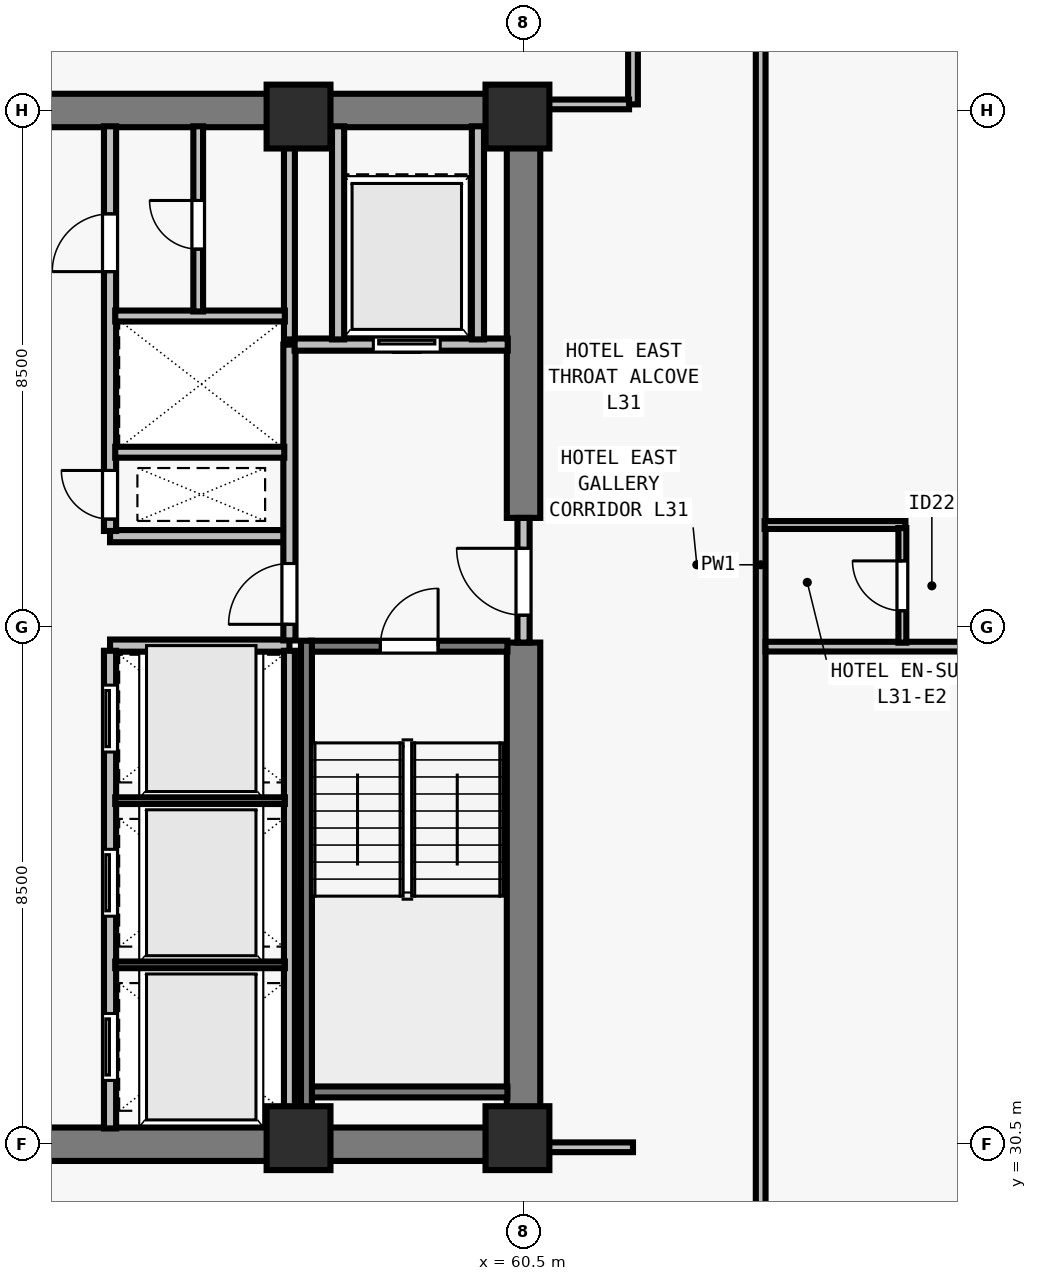
"""IFC4 building model, lengths in metres.
Left out: names, types, materials, properties, quantities, classifications, styles, units other than length and angle.
Written with IfcOpenShell. Run it as: python <this file> out.ifc"""

import sys

from ifc_helpers import new_model, si_unit, direction, frame, frame_2d, origin, origin_2d, place, context, subcontext, project, spatial, rectangle, extrude, element, fill, save


model = new_model("IFC4")
c1 = context("Model", 3, precision=1e-05, world=origin(), true_north=direction((0.0, 1.0)))
c2 = subcontext(c1, "Body", "Model", "MODEL_VIEW")
j1 = project(units=[si_unit("LENGTHUNIT", "METRE"), si_unit("PLANEANGLEUNIT", "RADIAN")], contexts=[c1])
p1 = place(None, origin())
s1 = spatial("IfcSite", under=j1, at=p1, CompositionType="ELEMENT")
p2 = place(p1, origin())
s2 = spatial("IfcBuilding", under=s1, at=p2, CompositionType="ELEMENT")
p3 = place(p2, frame((0.0, 0.0, 116.5)))
s3 = spatial("IfcBuildingStorey", under=s2, at=p3, CompositionType="ELEMENT", Elevation=116.5)
for number, where, z_axis, x_axis in (
    (1, (56.8, 30.6, 0.0), (0.0, 0.0, 1.0), (1.0, 0.0, 0.0)),
    (2, (60.4, 30.6, 0.0), (0.0, 0.0, 1.0), (1.0, 0.0, 0.0)),
    (3, (56.8, 47.4, 0.0), (0.0, 0.0, 1.0), (1.0, 0.0, 0.0)),
    (4, (60.4, 47.4, 0.0), (0.0, 0.0, 1.0), (1.0, 0.0, 0.0)),
):
    element("IfcColumn", number, at=place(p3, frame(where, z_axis=z_axis, x_axis=x_axis)), inside=s3, PredefinedType="COLUMN", context=c2, shape_type="SweptSolid", body=[
        extrude(rectangle(XDim=1.05, YDim=1.05, at=origin_2d()), origin(), (0.0, 0.0, 1.0), 3.5),
    ])
for number, where, z_axis, x_axis in (
    (5, (43.225, 30.5, 0.0), (0.0, 0.0, 1.0), (1.0, 0.0, 0.0)),
    (6, (43.225, 47.5, 0.0), (0.0, 0.0, 1.0), (1.0, 0.0, 0.0)),
):
    element("IfcWall", number, at=place(p3, frame(where, z_axis=z_axis, x_axis=x_axis)), inside=s3, PredefinedType="SHEAR", context=c2, shape_type="SweptSolid", body=[
        extrude(rectangle(XDim=17.55, YDim=0.55, at=frame_2d((8.775, 0.0))), origin(), (0.0, 0.0, 1.0), 3.28),
    ])
p4 = place(p3, frame((60.5, 30.765, 0.0), z_axis=(0.0, 0.0, 1.0), x_axis=(0.0, 1.0, 0.0)))
e7 = element("IfcWall", 7, at=p4, inside=s3, PredefinedType="SHEAR", context=c2, shape_type="SweptSolid", body=[
    extrude(rectangle(XDim=7.985, YDim=0.55, at=frame_2d((3.993, 0.0))), origin(), (0.0, 0.0, 1.0), 3.28),
])
p5 = place(p3, frame((60.5, 40.8, 0.0), z_axis=(0.0, 0.0, 1.0), x_axis=(0.0, 1.0, 0.0)))
e8 = element("IfcWall", 8, at=p5, inside=s3, PredefinedType="SHEAR", context=c2, shape_type="SweptSolid", body=[
    extrude(rectangle(XDim=6.435, YDim=0.55, at=frame_2d((3.218, 0.0))), origin(), (0.0, 0.0, 1.0), 3.28),
])
for number, where, z_axis, x_axis in (
    (9, (53.7, 38.7, 0.0), (0.0, 0.0, 1.0), (1.0, 0.0, 0.0)),
    (10, (53.7, 40.5, 0.0), (0.0, 0.0, 1.0), (1.0, 0.0, 0.0)),
):
    element("IfcWall", number, at=place(p3, frame(where, z_axis=z_axis, x_axis=x_axis)), inside=s3, PredefinedType="SOLIDWALL", context=c2, shape_type="SweptSolid", body=[
        extrude(rectangle(XDim=2.95, YDim=0.2, at=frame_2d((1.475, 0.0))), origin(), (0.0, 0.0, 1.0), 3.28),
    ])
p6 = place(p3, frame((53.7, 30.76, 0.0), z_axis=(0.0, 0.0, 1.0), x_axis=(0.0, 1.0, 0.0)))
e11 = element("IfcWall", 11, at=p6, inside=s3, PredefinedType="SOLIDWALL", context=c2, shape_type="SweptSolid", body=[
    extrude(rectangle(XDim=7.855, YDim=0.2, at=frame_2d((3.927, 0.0))), origin(), (0.0, 0.0, 1.0), 3.28),
])
p7 = place(p6, frame((0.79, 0.0, 0.0)))
e12 = element("IfcOpeningElement", 12, at=p7, cuts=e11, PredefinedType="OPENING", context=c2, shape_type="SweptSolid", body=[
    extrude(rectangle(XDim=1.1, YDim=2.2, at=frame_2d((0.55, 1.1))), frame((0.0, 0.11, 0.0), z_axis=(0.0, -1.0, 0.0), x_axis=(1.0, 0.0, 0.0)), (0.0, 0.0, 1.0), 0.22),
])
p8 = place(p6, frame((3.49, 0.0, 0.0)))
e13 = element("IfcOpeningElement", 13, at=p8, cuts=e11, PredefinedType="OPENING", context=c2, shape_type="SweptSolid", body=[
    extrude(rectangle(XDim=1.1, YDim=2.2, at=frame_2d((0.55, 1.1))), frame((0.0, 0.11, 0.0), z_axis=(0.0, -1.0, 0.0), x_axis=(1.0, 0.0, 0.0)), (0.0, 0.0, 1.0), 0.22),
])
p9 = place(p6, frame((6.19, 0.0, 0.0)))
e14 = element("IfcOpeningElement", 14, at=p9, cuts=e11, PredefinedType="OPENING", context=c2, shape_type="SweptSolid", body=[
    extrude(rectangle(XDim=1.1, YDim=2.2, at=frame_2d((0.55, 1.1))), frame((0.0, 0.11, 0.0), z_axis=(0.0, -1.0, 0.0), x_axis=(1.0, 0.0, 0.0)), (0.0, 0.0, 1.0), 0.22),
])
p10 = place(p3, frame((53.7, 40.585, 0.0), z_axis=(0.0, 0.0, 1.0), x_axis=(0.0, 1.0, 0.0)))
e15 = element("IfcWall", 15, at=p10, inside=s3, PredefinedType="SOLIDWALL", context=c2, shape_type="SweptSolid", body=[
    extrude(rectangle(XDim=6.655, YDim=0.2, at=frame_2d((3.328, 0.0))), origin(), (0.0, 0.0, 1.0), 3.28),
])
p11 = place(p10, frame((0.195, 0.0, 0.0)))
e16 = element("IfcOpeningElement", 16, at=p11, cuts=e15, PredefinedType="OPENING", context=c2, shape_type="SweptSolid", body=[
    extrude(rectangle(XDim=0.8, YDim=2.08, at=frame_2d((0.4, 1.04))), frame((0.0, 0.11, 0.0), z_axis=(0.0, -1.0, 0.0), x_axis=(1.0, 0.0, 0.0)), (0.0, 0.0, 1.0), 0.22),
])
p12 = place(p10, frame((4.265, 0.0, 0.0)))
e17 = element("IfcOpeningElement", 17, at=p12, cuts=e15, PredefinedType="OPENING", context=c2, shape_type="SweptSolid", body=[
    extrude(rectangle(XDim=0.95, YDim=2.12, at=frame_2d((0.475, 1.06))), frame((0.0, 0.11, 0.0), z_axis=(0.0, -1.0, 0.0), x_axis=(1.0, 0.0, 0.0)), (0.0, 0.0, 1.0), 0.22),
])
p13 = place(p3, frame((60.5, 38.75, 0.0), z_axis=(0.0, 0.0, 1.0), x_axis=(0.0, 1.0, 0.0)))
e18 = element("IfcWall", 18, at=p13, inside=s3, PredefinedType="SOLIDWALL", context=c2, shape_type="SweptSolid", body=[
    extrude(rectangle(XDim=2.05, YDim=0.2, at=frame_2d((1.025, 0.0))), origin(), (0.0, 0.0, 1.0), 3.28),
])
p14 = place(p13, frame((0.45, 0.0, 0.0)))
e19 = element("IfcOpeningElement", 19, at=p14, cuts=e18, PredefinedType="OPENING", context=c2, shape_type="SweptSolid", body=[
    extrude(rectangle(XDim=1.1, YDim=2.15, at=frame_2d((0.55, 1.075))), frame((0.0, 0.11, 0.0), z_axis=(0.0, -1.0, 0.0), x_axis=(1.0, 0.0, 0.0)), (0.0, 0.0, 1.0), 0.22),
])
p15 = place(p3, frame((56.65, 38.785, 0.0), z_axis=(0.0, 0.0, 1.0), x_axis=(0.0, 1.0, 0.0)))
e20 = element("IfcWall", 20, at=p15, inside=s3, PredefinedType="SOLIDWALL", context=c2, shape_type="SweptSolid", body=[
    extrude(rectangle(XDim=4.865, YDim=0.2, at=frame_2d((2.433, 0.0))), origin(), (0.0, 0.0, 1.0), 3.28),
])
p16 = place(p15, frame((0.265, 0.0, 0.0)))
e21 = element("IfcOpeningElement", 21, at=p16, cuts=e20, PredefinedType="OPENING", context=c2, shape_type="SweptSolid", body=[
    extrude(rectangle(XDim=1.0, YDim=2.15, at=frame_2d((0.5, 1.075))), frame((0.0, 0.11, 0.0), z_axis=(0.0, -1.0, 0.0), x_axis=(1.0, 0.0, 0.0)), (0.0, 0.0, 1.0), 0.22),
])
p17 = place(p3, frame((56.735, 43.65, 0.0), z_axis=(0.0, 0.0, 1.0), x_axis=(1.0, 0.0, 0.0)))
e22 = element("IfcWall", 22, at=p17, inside=s3, PredefinedType="SOLIDWALL", context=c2, shape_type="SweptSolid", body=[
    extrude(rectangle(XDim=3.505, YDim=0.2, at=frame_2d((1.752, 0.0))), origin(), (0.0, 0.0, 1.0), 3.28),
])
p18 = place(p17, frame((1.295, 0.0, 0.0)))
e23 = element("IfcOpeningElement", 23, at=p18, cuts=e22, PredefinedType="OPENING", context=c2, shape_type="SweptSolid", body=[
    extrude(rectangle(XDim=1.1, YDim=2.2, at=frame_2d((0.55, 1.1))), frame((0.0, 0.11, 0.0), z_axis=(0.0, -1.0, 0.0), x_axis=(1.0, 0.0, 0.0)), (0.0, 0.0, 1.0), 0.22),
])
for number, where, z_axis, x_axis in (
    (24, (57.45, 43.735, 0.0), (0.0, 0.0, 1.0), (0.0, 1.0, 0.0)),
    (25, (59.75, 43.735, 0.0), (0.0, 0.0, 1.0), (0.0, 1.0, 0.0)),
):
    element("IfcWall", number, at=place(p3, frame(where, z_axis=z_axis, x_axis=x_axis)), inside=s3, PredefinedType="SOLIDWALL", context=c2, shape_type="SweptSolid", body=[
        extrude(rectangle(XDim=3.505, YDim=0.2, at=frame_2d((1.752, 0.0))), origin(), (0.0, 0.0, 1.0), 3.28),
    ])
p19 = place(p3, frame((56.65, 30.76, 0.0), z_axis=(0.0, 0.0, 1.0), x_axis=(0.0, 1.0, 0.0)))
e26 = element("IfcWall", 26, at=p19, inside=s3, PredefinedType="SOLIDWALL", context=c2, shape_type="SweptSolid", body=[
    extrude(rectangle(XDim=7.855, YDim=0.18, at=frame_2d((3.927, 0.0))), origin(), (0.0, 0.0, 1.0), 3.28),
])
for number, where, z_axis, x_axis in (
    (27, (53.785, 33.45, 0.0), (0.0, 0.0, 1.0), (1.0, 0.0, 0.0)),
    (28, (53.785, 36.15, 0.0), (0.0, 0.0, 1.0), (1.0, 0.0, 0.0)),
):
    element("IfcWall", number, at=place(p3, frame(where, z_axis=z_axis, x_axis=x_axis)), inside=s3, PredefinedType="PARTITIONING", context=c2, shape_type="SweptSolid", body=[
        extrude(rectangle(XDim=2.79, YDim=0.11, at=frame_2d((1.395, 0.0))), origin(), (0.0, 0.0, 1.0), 3.28),
    ])
p20 = place(p3, frame((56.65, 43.735, 0.0), z_axis=(0.0, 0.0, 1.0), x_axis=(0.0, 1.0, 0.0)))
e29 = element("IfcWall", 29, at=p20, inside=s3, PredefinedType="SOLIDWALL", context=c2, shape_type="SweptSolid", body=[
    extrude(rectangle(XDim=3.505, YDim=0.18, at=frame_2d((1.752, 0.0))), origin(), (0.0, 0.0, 1.0), 3.28),
])
p21 = place(p3, frame((53.785, 41.88, 0.0), z_axis=(0.0, 0.0, 1.0), x_axis=(1.0, 0.0, 0.0)))
e30 = element("IfcWall", 30, at=p21, inside=s3, PredefinedType="SOLIDWALL", context=c2, shape_type="SweptSolid", body=[
    extrude(rectangle(XDim=2.78, YDim=0.18, at=frame_2d((1.39, 0.0))), origin(), (0.0, 0.0, 1.0), 3.28),
])
p22 = place(p3, frame((53.785, 44.12, 0.0), z_axis=(0.0, 0.0, 1.0), x_axis=(1.0, 0.0, 0.0)))
e31 = element("IfcWall", 31, at=p22, inside=s3, PredefinedType="SOLIDWALL", context=c2, shape_type="SweptSolid", body=[
    extrude(rectangle(XDim=2.79, YDim=0.18, at=frame_2d((1.395, 0.0))), origin(), (0.0, 0.0, 1.0), 3.28),
])
p23 = place(p3, frame((55.15, 44.195, 0.0), z_axis=(0.0, 0.0, 1.0), x_axis=(0.0, 1.0, 0.0)))
e32 = element("IfcWall", 32, at=p23, inside=s3, PredefinedType="PARTITIONING", context=c2, shape_type="SweptSolid", body=[
    extrude(rectangle(XDim=3.045, YDim=0.16, at=frame_2d((1.522, 0.0))), origin(), (0.0, 0.0, 1.0), 3.28),
])
p24 = place(p23, frame((1.025, 0.0, 0.0)))
e33 = element("IfcOpeningElement", 33, at=p24, cuts=e32, PredefinedType="OPENING", context=c2, shape_type="SweptSolid", body=[
    extrude(rectangle(XDim=0.8, YDim=2.1, at=frame_2d((0.4, 1.05))), frame((0.0, 0.09, 0.0), z_axis=(0.0, -1.0, 0.0), x_axis=(1.0, 0.0, 0.0)), (0.0, 0.0, 1.0), 0.18),
])
p25 = place(p3, frame((64.4, 15.325, 0.0), z_axis=(0.0, 0.0, 1.0), x_axis=(0.0, 1.0, 0.0)))
e34 = element("IfcWall", 34, at=p25, inside=s3, PredefinedType="PARTITIONING", context=c2, shape_type="SweptSolid", body=[
    extrude(rectangle(XDim=47.35, YDim=0.16, at=frame_2d((23.675, 0.0))), origin(), (0.0, 0.0, 1.0), 2.555),
])
p26 = place(p25, frame((12.547, 0.0, 0.0)))
e35 = element("IfcOpeningElement", 35, at=p26, cuts=e34, PredefinedType="OPENING", context=c2, shape_type="SweptSolid", body=[
    extrude(rectangle(XDim=0.96, YDim=2.15, at=frame_2d((0.48, 1.075))), frame((0.0, 0.09, 0.0), z_axis=(0.0, -1.0, 0.0), x_axis=(1.0, 0.0, 0.0)), (0.0, 0.0, 1.0), 0.18),
])
p27 = place(p25, frame((35.902, 0.0, 0.0)))
e36 = element("IfcOpeningElement", 36, at=p27, cuts=e34, PredefinedType="OPENING", context=c2, shape_type="SweptSolid", body=[
    extrude(rectangle(XDim=0.96, YDim=2.15, at=frame_2d((0.48, 1.075))), frame((0.0, 0.09, 0.0), z_axis=(0.0, -1.0, 0.0), x_axis=(1.0, 0.0, 0.0)), (0.0, 0.0, 1.0), 0.18),
])
p28 = place(p3, frame((62.3, 47.6, 0.0), z_axis=(0.0, 0.0, 1.0), x_axis=(0.0, 1.0, 0.0)))
e37 = element("IfcWall", 37, at=p28, inside=s3, PredefinedType="PARTITIONING", context=c2, shape_type="SweptSolid", body=[
    extrude(rectangle(XDim=15.075, YDim=0.16, at=frame_2d((7.538, 0.0))), origin(), (0.0, 0.0, 1.0), 2.555),
])
p29 = place(p3, frame((60.765, 30.45, 0.0), z_axis=(0.0, 0.0, 1.0), x_axis=(1.0, 0.0, 0.0)))
e38 = element("IfcWall", 38, at=p29, inside=s3, PredefinedType="PARTITIONING", context=c2, shape_type="SweptSolid", body=[
    extrude(rectangle(XDim=1.535, YDim=0.16, at=frame_2d((0.768, 0.0))), origin(), (0.0, 0.0, 1.0), 3.28),
])
p30 = place(p3, frame((60.765, 47.6, 0.0), z_axis=(0.0, 0.0, 1.0), x_axis=(1.0, 0.0, 0.0)))
e39 = element("IfcWall", 39, at=p30, inside=s3, PredefinedType="PARTITIONING", context=c2, shape_type="SweptSolid", body=[
    extrude(rectangle(XDim=1.47, YDim=0.16, at=frame_2d((0.735, 0.0))), origin(), (0.0, 0.0, 1.0), 3.28),
])
p31 = place(p3, frame((64.48, 38.683, 0.0), z_axis=(0.0, 0.0, 1.0), x_axis=(1.0, 0.0, 0.0)))
e40 = element("IfcWall", 40, at=p31, inside=s3, PredefinedType="PARTITIONING", context=c2, shape_type="SweptSolid", body=[
    extrude(rectangle(XDim=11.195, YDim=0.16, at=frame_2d((5.598, 0.0))), origin(), (0.0, 0.0, 1.0), 3.28),
])
p32 = place(p3, frame((64.465, 40.683, 0.0), z_axis=(0.0, 0.0, 1.0), x_axis=(1.0, 0.0, 0.0)))
e41 = element("IfcWall", 41, at=p32, inside=s3, PredefinedType="PLUMBINGWALL", context=c2, shape_type="SweptSolid", body=[
    extrude(rectangle(XDim=2.315, YDim=0.13, at=frame_2d((1.157, 0.0))), origin(), (0.0, 0.0, 1.0), 3.28),
])
p33 = place(p3, frame((66.73, 38.748, 0.0), z_axis=(0.0, 0.0, 1.0), x_axis=(0.0, 1.0, 0.0)))
e42 = element("IfcWall", 42, at=p33, inside=s3, PredefinedType="PLUMBINGWALL", context=c2, shape_type="SweptSolid", body=[
    extrude(rectangle(XDim=1.885, YDim=0.13, at=frame_2d((0.942, 0.0))), origin(), (0.0, 0.0, 1.0), 3.28),
])
p34 = place(p33, frame((0.525, 0.0, 0.0)))
e43 = element("IfcOpeningElement", 43, at=p34, cuts=e42, PredefinedType="OPENING", context=c2, shape_type="SweptSolid", body=[
    extrude(rectangle(XDim=0.82, YDim=2.1, at=frame_2d((0.41, 1.05))), frame((0.0, 0.075, 0.0), z_axis=(0.0, -1.0, 0.0), x_axis=(1.0, 0.0, 0.0)), (0.0, 0.0, 1.0), 0.15),
])
p35 = place(p3, frame((57.005, 38.69, 0.0), z_axis=(0.0, 0.0, 1.0), x_axis=(1.0, 0.0, 0.0)))
e44 = element("IfcWall", 44, at=p35, inside=s3, PredefinedType="SOLIDWALL", context=c2, shape_type="SweptSolid", body=[
    extrude(rectangle(XDim=3.23, YDim=0.18, at=frame_2d((1.615, 0.0))), origin(), (0.0, 0.0, 1.0), 3.28),
])
p36 = place(p35, frame((1.14, 0.0, 0.0)))
e45 = element("IfcOpeningElement", 45, at=p36, cuts=e44, PredefinedType="OPENING", context=c2, shape_type="SweptSolid", body=[
    extrude(rectangle(XDim=0.95, YDim=2.15, at=frame_2d((0.475, 1.075))), frame((0.0, 0.1, 0.0), z_axis=(0.0, -1.0, 0.0), x_axis=(1.0, 0.0, 0.0)), (0.0, 0.0, 1.0), 0.2),
])
p37 = place(p3, frame((57.005, 31.36, 0.0), z_axis=(0.0, 0.0, 1.0), x_axis=(1.0, 0.0, 0.0)))
e46 = element("IfcWall", 46, at=p37, inside=s3, PredefinedType="SOLIDWALL", context=c2, shape_type="SweptSolid", body=[
    extrude(rectangle(XDim=3.23, YDim=0.18, at=frame_2d((1.615, 0.0))), origin(), (0.0, 0.0, 1.0), 3.28),
])
p38 = place(p3, frame((56.93, 38.78, 0.0), z_axis=(0.0, 0.0, 1.0), x_axis=(0.0, -1.0, 0.0)))
e47 = element("IfcWall", 47, at=p38, inside=s3, PredefinedType="SOLIDWALL", context=c2, shape_type="SweptSolid", body=[
    extrude(rectangle(XDim=8.017, YDim=0.18, at=frame_2d((4.009, 0.0))), origin(), (0.0, 0.0, 1.0), 3.28),
])
p39 = place(p14, origin())
e48 = element("IfcDoor", 48, at=p39, inside=s3, OperationType="SINGLE_SWING_RIGHT", PredefinedType="DOOR", context=c2, shape_type="SweptSolid", body=[
    extrude(rectangle(XDim=1.1, YDim=2.15, at=frame_2d((0.55, 1.075))), frame((0.0, 0.025, 0.0), z_axis=(0.0, -1.0, 0.0), x_axis=(1.0, 0.0, 0.0)), (0.0, 0.0, 1.0), 0.05),
])
fill(e19, e48)
p40 = place(p16, origin())
e49 = element("IfcDoor", 49, at=p40, inside=s3, OperationType="SINGLE_SWING_LEFT", PredefinedType="DOOR", context=c2, shape_type="SweptSolid", body=[
    extrude(rectangle(XDim=1.0, YDim=2.15, at=frame_2d((0.5, 1.075))), frame((0.0, 0.025, 0.0), z_axis=(0.0, -1.0, 0.0), x_axis=(1.0, 0.0, 0.0)), (0.0, 0.0, 1.0), 0.05),
])
fill(e21, e49)
p41 = place(p18, origin())
e50 = element("IfcDoor", 50, at=p41, inside=s3, OperationType="SLIDING_TO_LEFT", PredefinedType="DOOR", context=c2, shape_type="SweptSolid", body=[
    extrude(rectangle(XDim=1.1, YDim=2.2, at=frame_2d((0.55, 1.1))), frame((0.0, 0.025, 0.0), z_axis=(0.0, -1.0, 0.0), x_axis=(1.0, 0.0, 0.0)), (0.0, 0.0, 1.0), 0.05),
])
fill(e23, e50)
p42 = place(p7, origin())
e51 = element("IfcDoor", 51, at=p42, inside=s3, OperationType="SLIDING_TO_LEFT", PredefinedType="DOOR", context=c2, shape_type="SweptSolid", body=[
    extrude(rectangle(XDim=1.1, YDim=2.2, at=frame_2d((0.55, 1.1))), frame((0.0, 0.025, 0.0), z_axis=(0.0, -1.0, 0.0), x_axis=(1.0, 0.0, 0.0)), (0.0, 0.0, 1.0), 0.05),
])
fill(e12, e51)
p43 = place(p8, origin())
e52 = element("IfcDoor", 52, at=p43, inside=s3, OperationType="SLIDING_TO_LEFT", PredefinedType="DOOR", context=c2, shape_type="SweptSolid", body=[
    extrude(rectangle(XDim=1.1, YDim=2.2, at=frame_2d((0.55, 1.1))), frame((0.0, 0.025, 0.0), z_axis=(0.0, -1.0, 0.0), x_axis=(1.0, 0.0, 0.0)), (0.0, 0.0, 1.0), 0.05),
])
fill(e13, e52)
p44 = place(p9, origin())
e53 = element("IfcDoor", 53, at=p44, inside=s3, OperationType="SLIDING_TO_LEFT", PredefinedType="DOOR", context=c2, shape_type="SweptSolid", body=[
    extrude(rectangle(XDim=1.1, YDim=2.2, at=frame_2d((0.55, 1.1))), frame((0.0, 0.025, 0.0), z_axis=(0.0, -1.0, 0.0), x_axis=(1.0, 0.0, 0.0)), (0.0, 0.0, 1.0), 0.05),
])
fill(e14, e53)
p45 = place(p11, origin())
e54 = element("IfcDoor", 54, at=p45, inside=s3, OperationType="SINGLE_SWING_RIGHT", PredefinedType="DOOR", context=c2, shape_type="SweptSolid", body=[
    extrude(rectangle(XDim=0.8, YDim=2.08, at=frame_2d((0.4, 1.04))), frame((0.0, 0.025, 0.0), z_axis=(0.0, -1.0, 0.0), x_axis=(1.0, 0.0, 0.0)), (0.0, 0.0, 1.0), 0.05),
])
fill(e16, e54)
p46 = place(p12, origin())
e55 = element("IfcDoor", 55, at=p46, inside=s3, OperationType="SINGLE_SWING_LEFT", PredefinedType="DOOR", context=c2, shape_type="SweptSolid", body=[
    extrude(rectangle(XDim=0.95, YDim=2.12, at=frame_2d((0.475, 1.06))), frame((0.0, 0.025, 0.0), z_axis=(0.0, -1.0, 0.0), x_axis=(1.0, 0.0, 0.0)), (0.0, 0.0, 1.0), 0.05),
])
fill(e17, e55)
p47 = place(p24, origin())
e56 = element("IfcDoor", 56, at=p47, inside=s3, OperationType="SINGLE_SWING_RIGHT", PredefinedType="DOOR", context=c2, shape_type="SweptSolid", body=[
    extrude(rectangle(XDim=0.8, YDim=2.1, at=frame_2d((0.4, 1.05))), frame((0.0, 0.025, 0.0), z_axis=(0.0, -1.0, 0.0), x_axis=(1.0, 0.0, 0.0)), (0.0, 0.0, 1.0), 0.05),
])
fill(e33, e56)
p48 = place(p34, origin())
e57 = element("IfcDoor", 57, at=p48, inside=s3, OperationType="SINGLE_SWING_RIGHT", PredefinedType="DOOR", context=c2, shape_type="SweptSolid", body=[
    extrude(rectangle(XDim=0.82, YDim=2.1, at=frame_2d((0.41, 1.05))), frame((0.0, 0.025, 0.0), z_axis=(0.0, -1.0, 0.0), x_axis=(1.0, 0.0, 0.0)), (0.0, 0.0, 1.0), 0.05),
])
fill(e43, e57)
p49 = place(p36, origin())
e58 = element("IfcDoor", 58, at=p49, inside=s3, OperationType="SINGLE_SWING_RIGHT", PredefinedType="DOOR", context=c2, shape_type="SweptSolid", body=[
    extrude(rectangle(XDim=0.95, YDim=2.15, at=frame_2d((0.475, 1.075))), frame((0.0, 0.025, 0.0), z_axis=(0.0, -1.0, 0.0), x_axis=(1.0, 0.0, 0.0)), (0.0, 0.0, 1.0), 0.05),
])
fill(e45, e58)
save(model, sys.argv[1])
